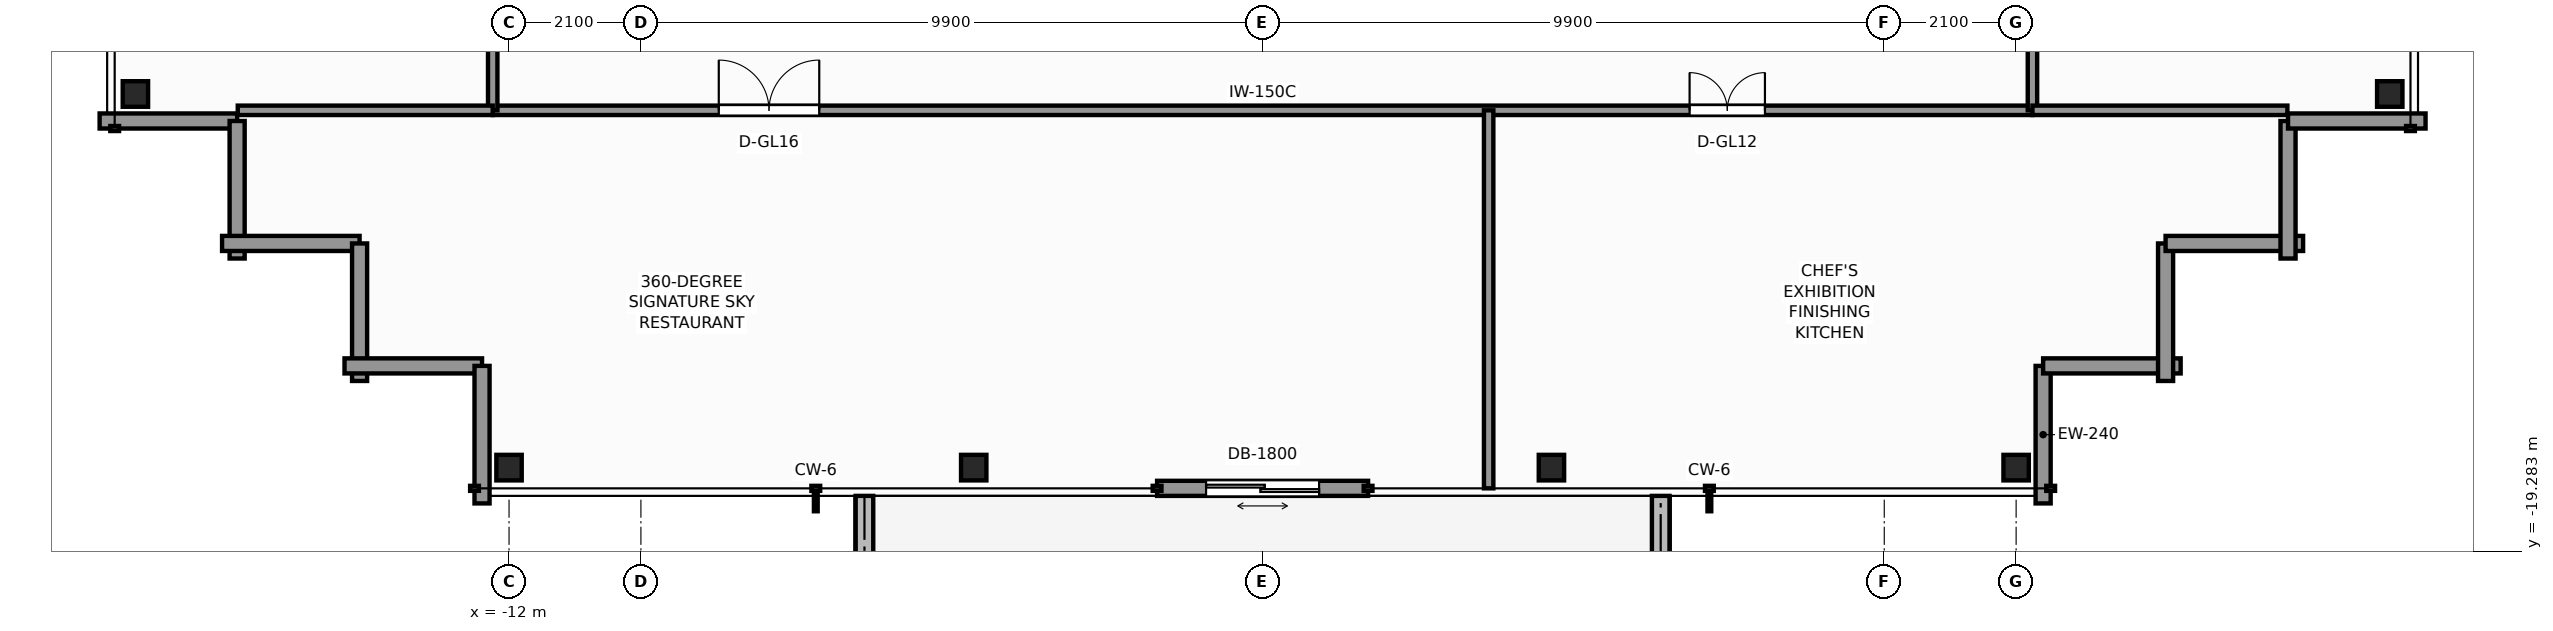
"""IFC4 building model, lengths in metres.
Left out: names, types, materials, properties, quantities, classifications, styles, units other than length and angle.
Written with IfcOpenShell. Run it as: python <this file> out.ifc"""

import sys

from ifc_helpers import new_model, si_unit, direction, frame, frame_2d, origin, origin_2d, place, context, subcontext, project, spatial, rectangle, i_section, extrude, element, fill, save


model = new_model("IFC4")
c1 = context("Model", 3, precision=1e-05, world=origin(), true_north=direction((0.0, 1.0)))
c2 = subcontext(c1, "Body", "Model", "MODEL_VIEW")
j1 = project(units=[si_unit("LENGTHUNIT", "METRE"), si_unit("PLANEANGLEUNIT", "RADIAN")], contexts=[c1])
p1 = place(None, origin())
s1 = spatial("IfcSite", under=j1, at=p1, CompositionType="ELEMENT")
p2 = place(p1, origin())
s2 = spatial("IfcBuilding", under=s1, at=p2, CompositionType="ELEMENT")
p3 = place(p2, frame((0.0, 0.0, 262.8)))
s3 = spatial("IfcBuildingStorey", under=s2, at=p3, CompositionType="ELEMENT", Elevation=262.8)
for number, where, z_axis, x_axis in (
    (1, (-12.0, -17.95, 0.0), (0.0, 0.0, 1.0), (1.0, 0.0, 0.0)),
    (2, (-4.6, -17.95, 0.0), (0.0, 0.0, 1.0), (1.0, 0.0, 0.0)),
    (3, (4.6, -17.95, 0.0), (0.0, 0.0, 1.0), (1.0, 0.0, 0.0)),
    (4, (12.0, -17.95, 0.0), (0.0, 0.0, 1.0), (1.0, 0.0, 0.0)),
    (5, (-17.95, -12.0, 0.0), (0.0, 0.0, 1.0), (1.0, 0.0, 0.0)),
    (6, (17.95, -12.0, 0.0), (0.0, 0.0, 1.0), (1.0, 0.0, 0.0)),
):
    element("IfcColumn", number, at=place(p3, frame(where, z_axis=z_axis, x_axis=x_axis)), inside=s3, PredefinedType="COLUMN", context=c2, shape_type="SweptSolid", body=[
        extrude(i_section(OverallWidth=0.404, OverallDepth=0.407, WebThickness=0.027, FlangeThickness=0.044, FilletRadius=0.025, at=origin_2d()), origin(), (0.0, 0.0, 1.0), 4.6),
    ])
for number, where, z_axis, x_axis in (
    (7, (6.34, -21.7, -0.02), (0.0, 0.0, 1.0), (0.0, 1.0, 0.0)),
    (8, (-6.34, -18.4, -0.02), (0.0, 0.0, 1.0), (0.0, -1.0, 0.0)),
):
    element("IfcWall", number, at=place(p3, frame(where, z_axis=z_axis, x_axis=x_axis)), inside=s3, PredefinedType="PARAPET", context=c2, shape_type="SweptSolid", body=[
        extrude(rectangle(XDim=3.3, YDim=0.28, at=frame_2d((1.65, 0.0))), origin(), (0.0, 0.0, 1.0), 0.42),
    ])
p4 = place(p3, frame((1.68, -18.28, 0.0), z_axis=(0.0, 0.0, 1.0), x_axis=(-1.0, 0.0, 0.0)))
e9 = element("IfcWall", 9, at=p4, inside=s3, PredefinedType="STANDARD", context=c2, shape_type="SweptSolid", body=[
    extrude(rectangle(XDim=3.36, YDim=0.24, at=frame_2d((1.68, 0.0))), origin(), (0.0, 0.0, 1.0), 4.32),
])
p5 = place(p4, frame((0.78, 0.0, 0.0)))
e10 = element("IfcOpeningElement", 10, at=p5, cuts=e9, PredefinedType="OPENING", context=c2, shape_type="SweptSolid", body=[
    extrude(rectangle(XDim=1.8, YDim=2.2, at=frame_2d((0.9, 1.1))), frame((0.0, 0.13, 0.0), z_axis=(0.0, -1.0, 0.0), x_axis=(1.0, 0.0, 0.0)), (0.0, 0.0, 1.0), 0.26),
])
p6 = place(p3, frame((12.43, -16.33, 0.0), z_axis=(0.0, 0.0, 1.0), x_axis=(0.0, -1.0, 0.0)))
e11 = element("IfcWall", 11, at=p6, inside=s3, PredefinedType="STANDARD", context=c2, shape_type="SweptSolid", body=[
    extrude(rectangle(XDim=2.19, YDim=0.24, at=frame_2d((1.095, 0.0))), origin(), (0.0, 0.0, 1.0), 3.703),
])
for number, where, z_axis, x_axis in (
    (12, (14.62, -16.33, 0.0), (0.0, 0.0, 1.0), (-1.0, 0.0, 0.0)),
    (13, (14.38, -14.38, 0.0), (0.0, 0.0, 1.0), (0.0, -1.0, 0.0)),
    (14, (16.57, -14.38, 0.0), (0.0, 0.0, 1.0), (-1.0, 0.0, 0.0)),
    (15, (16.33, -12.43, 0.0), (0.0, 0.0, 1.0), (0.0, -1.0, 0.0)),
):
    element("IfcWall", number, at=place(p3, frame(where, z_axis=z_axis, x_axis=x_axis)), inside=s3, PredefinedType="STANDARD", context=c2, shape_type="SweptSolid", body=[
        extrude(rectangle(XDim=2.19, YDim=0.24, at=frame_2d((1.095, 0.0))), origin(), (0.0, 0.0, 1.0), 3.703),
    ])
for number, where, z_axis, x_axis in (
    (16, (18.52, -12.43, 0.0), (0.0, 0.0, 1.0), (-1.0, 0.0, 0.0)),
    (17, (-16.33, -12.43, 0.0), (0.0, 0.0, 1.0), (-1.0, 0.0, 0.0)),
):
    element("IfcWall", number, at=place(p3, frame(where, z_axis=z_axis, x_axis=x_axis)), inside=s3, PredefinedType="STANDARD", context=c2, shape_type="SweptSolid", body=[
        extrude(rectangle(XDim=2.19, YDim=0.24, at=frame_2d((1.095, 0.0))), origin(), (0.0, 0.0, 1.0), 3.703),
    ])
for number, where, z_axis, x_axis in (
    (18, (-16.33, -14.62, 0.0), (0.0, 0.0, 1.0), (0.0, 1.0, 0.0)),
    (19, (-14.38, -14.38, 0.0), (0.0, 0.0, 1.0), (-1.0, 0.0, 0.0)),
    (20, (-14.38, -16.57, 0.0), (0.0, 0.0, 1.0), (0.0, 1.0, 0.0)),
    (21, (-12.43, -16.33, 0.0), (0.0, 0.0, 1.0), (-1.0, 0.0, 0.0)),
):
    element("IfcWall", number, at=place(p3, frame(where, z_axis=z_axis, x_axis=x_axis)), inside=s3, PredefinedType="STANDARD", context=c2, shape_type="SweptSolid", body=[
        extrude(rectangle(XDim=2.19, YDim=0.24, at=frame_2d((1.095, 0.0))), origin(), (0.0, 0.0, 1.0), 3.703),
    ])
p7 = place(p3, frame((-12.43, -18.52, 0.0), z_axis=(0.0, 0.0, 1.0), x_axis=(0.0, 1.0, 0.0)))
e22 = element("IfcWall", 22, at=p7, inside=s3, PredefinedType="STANDARD", context=c2, shape_type="SweptSolid", body=[
    extrude(rectangle(XDim=2.19, YDim=0.24, at=frame_2d((1.095, 0.0))), origin(), (0.0, 0.0, 1.0), 3.703),
])
p8 = place(p3, frame((-12.26, -12.26, 0.0), z_axis=(0.0, 0.0, 1.0), x_axis=(1.0, 0.0, 0.0)))
e23 = element("IfcWall", 23, at=p8, inside=s3, PredefinedType="PARTITIONING", context=c2, shape_type="SweptSolid", body=[
    extrude(rectangle(XDim=24.52, YDim=0.15, at=frame_2d((12.26, 0.0))), origin(), (0.0, 0.0, 1.0), 3.609),
])
p9 = place(p8, frame((3.6, 0.0, 0.0)))
e24 = element("IfcOpeningElement", 24, at=p9, cuts=e23, PredefinedType="OPENING", context=c2, shape_type="SweptSolid", body=[
    extrude(rectangle(XDim=1.6, YDim=2.3, at=frame_2d((0.8, 1.15))), frame((0.0, 0.085, 0.0), z_axis=(0.0, -1.0, 0.0), x_axis=(1.0, 0.0, 0.0)), (0.0, 0.0, 1.0), 0.17),
])
p10 = place(p8, frame((19.06, 0.0, 0.0)))
e25 = element("IfcOpeningElement", 25, at=p10, cuts=e23, PredefinedType="OPENING", context=c2, shape_type="SweptSolid", body=[
    extrude(rectangle(XDim=1.2, YDim=2.2, at=frame_2d((0.6, 1.1))), frame((0.0, 0.085, 0.0), z_axis=(0.0, -1.0, 0.0), x_axis=(1.0, 0.0, 0.0)), (0.0, 0.0, 1.0), 0.17),
])
p11 = place(p3, frame((-12.26, -12.26, 0.0), z_axis=(0.0, 0.0, 1.0), x_axis=(0.0, 1.0, 0.0)))
e26 = element("IfcWall", 26, at=p11, inside=s3, PredefinedType="PARTITIONING", context=c2, shape_type="SweptSolid", body=[
    extrude(rectangle(XDim=24.52, YDim=0.15, at=frame_2d((12.26, 0.0))), origin(), (0.0, 0.0, 1.0), 3.609),
])
p12 = place(p11, frame((11.5, 0.0, 0.0)))
e27 = element("IfcOpeningElement", 27, at=p12, cuts=e26, PredefinedType="OPENING", context=c2, shape_type="SweptSolid", body=[
    extrude(rectangle(XDim=1.2, YDim=2.2, at=frame_2d((0.6, 1.1))), frame((0.0, 0.085, 0.0), z_axis=(0.0, -1.0, 0.0), x_axis=(1.0, 0.0, 0.0)), (0.0, 0.0, 1.0), 0.17),
])
p13 = place(p3, frame((12.26, -12.26, 0.0), z_axis=(0.0, 0.0, 1.0), x_axis=(0.0, 1.0, 0.0)))
e28 = element("IfcWall", 28, at=p13, inside=s3, PredefinedType="PARTITIONING", context=c2, shape_type="SweptSolid", body=[
    extrude(rectangle(XDim=24.52, YDim=0.15, at=frame_2d((12.26, 0.0))), origin(), (0.0, 0.0, 1.0), 3.609),
])
p14 = place(p13, frame((3.4, 0.0, 0.0)))
e29 = element("IfcOpeningElement", 29, at=p14, cuts=e28, PredefinedType="OPENING", context=c2, shape_type="SweptSolid", body=[
    extrude(rectangle(XDim=0.95, YDim=2.06, at=frame_2d((0.475, 1.03))), frame((0.0, 0.085, 0.0), z_axis=(0.0, -1.0, 0.0), x_axis=(1.0, 0.0, 0.0)), (0.0, 0.0, 1.0), 0.17),
])
p15 = place(p13, frame((20.22, 0.0, 0.0)))
e30 = element("IfcOpeningElement", 30, at=p15, cuts=e28, PredefinedType="OPENING", context=c2, shape_type="SweptSolid", body=[
    extrude(rectangle(XDim=0.95, YDim=2.06, at=frame_2d((0.475, 1.03))), frame((0.0, 0.085, 0.0), z_axis=(0.0, -1.0, 0.0), x_axis=(1.0, 0.0, 0.0)), (0.0, 0.0, 1.0), 0.17),
])
for number, where, z_axis, x_axis in (
    (31, (-16.32, -12.26, 0.0), (0.0, 0.0, 1.0), (1.0, 0.0, 0.0)),
    (32, (12.26, -12.26, 0.0), (0.0, 0.0, 1.0), (1.0, 0.0, 0.0)),
):
    element("IfcWall", number, at=place(p3, frame(where, z_axis=z_axis, x_axis=x_axis)), inside=s3, PredefinedType="PARTITIONING", context=c2, shape_type="SweptSolid", body=[
        extrude(rectangle(XDim=4.06, YDim=0.15, at=frame_2d((2.03, 0.0))), origin(), (0.0, 0.0, 1.0), 4.32),
    ])
p16 = place(p3, frame((3.6, -18.28, 0.0), z_axis=(0.0, 0.0, 1.0), x_axis=(0.0, 1.0, 0.0)))
e33 = element("IfcWall", 33, at=p16, inside=s3, PredefinedType="PARTITIONING", context=c2, shape_type="SweptSolid", body=[
    extrude(rectangle(XDim=6.02, YDim=0.15, at=frame_2d((3.01, 0.0))), origin(), (0.0, 0.0, 1.0), 3.693),
])
p17 = place(p5, origin())
e34 = element("IfcDoor", 34, at=p17, inside=s3, OperationType="DOUBLE_DOOR_SLIDING", PredefinedType="DOOR", context=c2, shape_type="SweptSolid", body=[
    extrude(rectangle(XDim=1.8, YDim=2.2, at=frame_2d((0.9, 1.1))), frame((0.0, 0.025, 0.0), z_axis=(0.0, -1.0, 0.0), x_axis=(1.0, 0.0, 0.0)), (0.0, 0.0, 1.0), 0.05),
])
fill(e10, e34)
p18 = place(p9, origin())
e35 = element("IfcDoor", 35, at=p18, inside=s3, OperationType="DOUBLE_DOOR_SINGLE_SWING", PredefinedType="DOOR", context=c2, shape_type="SweptSolid", body=[
    extrude(rectangle(XDim=1.6, YDim=2.3, at=frame_2d((0.8, 1.15))), frame((0.0, 0.025, 0.0), z_axis=(0.0, -1.0, 0.0), x_axis=(1.0, 0.0, 0.0)), (0.0, 0.0, 1.0), 0.05),
])
fill(e24, e35)
p19 = place(p10, origin())
e36 = element("IfcDoor", 36, at=p19, inside=s3, OperationType="DOUBLE_DOOR_SINGLE_SWING", PredefinedType="DOOR", context=c2, shape_type="SweptSolid", body=[
    extrude(rectangle(XDim=1.2, YDim=2.2, at=frame_2d((0.6, 1.1))), frame((0.0, 0.025, 0.0), z_axis=(0.0, -1.0, 0.0), x_axis=(1.0, 0.0, 0.0)), (0.0, 0.0, 1.0), 0.05),
])
fill(e25, e36)
save(model, sys.argv[1])
